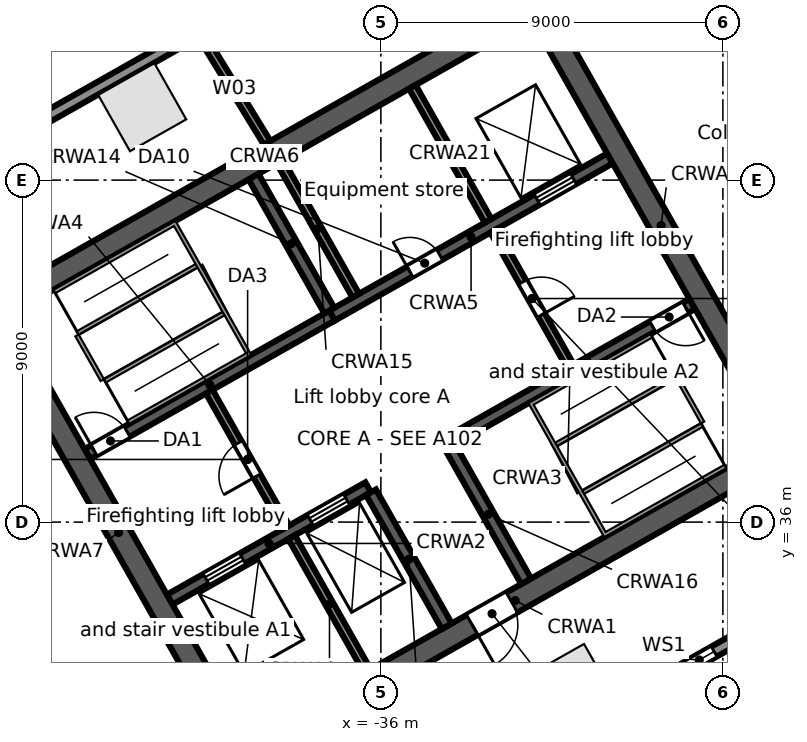
"""IFC4 building model, lengths in metres.
Left out: names, types, materials, properties, quantities, classifications, styles, units other than length and angle.
Written with IfcOpenShell. Run it as: python <this file> out.ifc"""

import sys

from ifc_helpers import new_model, si_unit, direction, frame, frame_2d, origin, origin_2d, place, context, subcontext, project, spatial, rectangle, extrude, element, fill, save


model = new_model("IFC4")
c1 = context("Model", 3, precision=1e-05, world=origin(), true_north=direction((0.0, 1.0)))
c2 = subcontext(c1, "Body", "Model", "MODEL_VIEW")
j1 = project(units=[si_unit("LENGTHUNIT", "METRE"), si_unit("PLANEANGLEUNIT", "RADIAN")], contexts=[c1])
p1 = place(None, origin())
s1 = spatial("IfcSite", under=j1, at=p1, CompositionType="ELEMENT")
p2 = place(p1, origin())
s2 = spatial("IfcBuilding", under=s1, at=p2, CompositionType="ELEMENT")
p3 = place(p2, frame((0.0, 0.0, 56.5)))
s3 = spatial("IfcBuildingStorey", under=s2, at=p3, CompositionType="ELEMENT", Elevation=56.5)
for number, where, z_axis, x_axis in (
    (1, (-42.28, 46.919, 0.0), (0.0, 0.0, 1.0), (-0.87, -0.492, 0.0)),
    (2, (-30.976, 31.635, 0.0), (0.0, 0.0, 1.0), (0.87, 0.492, 0.0)),
):
    element("IfcColumn", number, at=place(p3, frame(where, z_axis=z_axis, x_axis=x_axis)), inside=s3, PredefinedType="COLUMN", context=c2, shape_type="SweptSolid", body=[
        extrude(rectangle(XDim=1.7, YDim=1.7, at=origin_2d()), origin(), (0.0, 0.0, 1.0), 5.0),
    ])
p4 = place(p3, frame((-58.745, 38.764, 0.0), z_axis=(0.0, 0.0, 1.0), x_axis=(0.870355811726, 0.492423355453, 0.0)))
e3 = element("IfcWall", 3, at=p4, inside=s3, PredefinedType="STANDARD", context=c2, shape_type="SweptSolid", body=[
    extrude(rectangle(XDim=64.025, YDim=0.3, at=frame_2d((32.013, 0.0))), origin(), (0.0, 0.0, 1.0), 4.68),
])
p5 = place(p4, frame((60.122, 0.0, 0.6)))
e4 = element("IfcOpeningElement", 4, at=p5, cuts=e3, PredefinedType="OPENING", context=c2, shape_type="SweptSolid", body=[
    extrude(rectangle(XDim=0.9, YDim=3.2, at=frame_2d((0.45, 1.6))), frame((0.0, 0.16, 0.0), z_axis=(0.0, -1.0, 0.0), x_axis=(1.0, 0.0, 0.0)), (0.0, 0.0, 1.0), 0.32),
])
p6 = place(p4, frame((50.992, 0.0, 0.6)))
e5 = element("IfcOpeningElement", 5, at=p6, cuts=e3, PredefinedType="OPENING", context=c2, shape_type="SweptSolid", body=[
    extrude(rectangle(XDim=0.9, YDim=3.2, at=frame_2d((0.45, 1.6))), frame((0.0, 0.16, 0.0), z_axis=(0.0, -1.0, 0.0), x_axis=(1.0, 0.0, 0.0)), (0.0, 0.0, 1.0), 0.32),
])
p7 = place(p4, frame((41.862, 0.0, 0.6)))
e6 = element("IfcOpeningElement", 6, at=p7, cuts=e3, PredefinedType="OPENING", context=c2, shape_type="SweptSolid", body=[
    extrude(rectangle(XDim=0.9, YDim=3.2, at=frame_2d((0.45, 1.6))), frame((0.0, 0.16, 0.0), z_axis=(0.0, -1.0, 0.0), x_axis=(1.0, 0.0, 0.0)), (0.0, 0.0, 1.0), 0.32),
])
p8 = place(p4, frame((32.732, 0.0, 0.6)))
e7 = element("IfcOpeningElement", 7, at=p8, cuts=e3, PredefinedType="OPENING", context=c2, shape_type="SweptSolid", body=[
    extrude(rectangle(XDim=0.9, YDim=3.2, at=frame_2d((0.45, 1.6))), frame((0.0, 0.16, 0.0), z_axis=(0.0, -1.0, 0.0), x_axis=(1.0, 0.0, 0.0)), (0.0, 0.0, 1.0), 0.32),
])
p9 = place(p4, frame((23.602, 0.0, 0.6)))
e8 = element("IfcOpeningElement", 8, at=p9, cuts=e3, PredefinedType="OPENING", context=c2, shape_type="SweptSolid", body=[
    extrude(rectangle(XDim=0.9, YDim=3.2, at=frame_2d((0.45, 1.6))), frame((0.0, 0.16, 0.0), z_axis=(0.0, -1.0, 0.0), x_axis=(1.0, 0.0, 0.0)), (0.0, 0.0, 1.0), 0.32),
])
p10 = place(p4, frame((14.472, 0.0, 0.6)))
e9 = element("IfcOpeningElement", 9, at=p10, cuts=e3, PredefinedType="OPENING", context=c2, shape_type="SweptSolid", body=[
    extrude(rectangle(XDim=0.9, YDim=3.2, at=frame_2d((0.45, 1.6))), frame((0.0, 0.16, 0.0), z_axis=(0.0, -1.0, 0.0), x_axis=(1.0, 0.0, 0.0)), (0.0, 0.0, 1.0), 0.32),
])
p11 = place(p4, frame((5.342, 0.0, 0.6)))
e10 = element("IfcOpeningElement", 10, at=p11, cuts=e3, PredefinedType="OPENING", context=c2, shape_type="SweptSolid", body=[
    extrude(rectangle(XDim=0.9, YDim=3.2, at=frame_2d((0.45, 1.6))), frame((0.0, 0.16, 0.0), z_axis=(0.0, -1.0, 0.0), x_axis=(1.0, 0.0, 0.0)), (0.0, 0.0, 1.0), 0.32),
])
p12 = place(p3, frame((-44.109, 26.504, 0.0), z_axis=(0.0, 0.0, 1.0), x_axis=(-0.857169502585, 0.515034410344, 0.0)))
e11 = element("IfcWall", 11, at=p12, inside=s3, PredefinedType="STANDARD", context=c2, shape_type="SweptSolid", body=[
    extrude(rectangle(XDim=17.127, YDim=0.3, at=frame_2d((8.563, 0.0))), origin(), (0.0, 0.0, 1.0), 4.68),
])
p13 = place(p12, frame((13.403, 0.0, 0.6)))
e12 = element("IfcOpeningElement", 12, at=p13, cuts=e11, PredefinedType="OPENING", context=c2, shape_type="SweptSolid", body=[
    extrude(rectangle(XDim=0.9, YDim=3.2, at=frame_2d((0.45, 1.6))), frame((0.0, 0.16, 0.0), z_axis=(0.0, -1.0, 0.0), x_axis=(1.0, 0.0, 0.0)), (0.0, 0.0, 1.0), 0.32),
])
p14 = place(p12, frame((4.903, 0.0, 0.6)))
e13 = element("IfcOpeningElement", 13, at=p14, cuts=e11, PredefinedType="OPENING", context=c2, shape_type="SweptSolid", body=[
    extrude(rectangle(XDim=0.9, YDim=3.2, at=frame_2d((0.45, 1.6))), frame((0.0, 0.16, 0.0), z_axis=(0.0, -1.0, 0.0), x_axis=(1.0, 0.0, 0.0)), (0.0, 0.0, 1.0), 0.32),
])
p15 = place(p3, frame((-0.055, 47.969, 0.0), z_axis=(0.0, 0.0, 1.0), x_axis=(-0.870355730478, -0.492423499058, 0.0)))
e14 = element("IfcWall", 14, at=p15, inside=s3, PredefinedType="STANDARD", context=c2, shape_type="SweptSolid", body=[
    extrude(rectangle(XDim=43.75, YDim=0.3, at=frame_2d((21.875, 0.0))), origin(), (0.0, 0.0, 1.0), 4.68),
])
p16 = place(p15, frame((39.977, 0.0, 0.6)))
e15 = element("IfcOpeningElement", 15, at=p16, cuts=e14, PredefinedType="OPENING", context=c2, shape_type="SweptSolid", body=[
    extrude(rectangle(XDim=0.9, YDim=3.2, at=frame_2d((0.45, 1.6))), frame((0.0, 0.16, 0.0), z_axis=(0.0, -1.0, 0.0), x_axis=(1.0, 0.0, 0.0)), (0.0, 0.0, 1.0), 0.32),
])
p17 = place(p15, frame((31.222, 0.0, 0.6)))
e16 = element("IfcOpeningElement", 16, at=p17, cuts=e14, PredefinedType="OPENING", context=c2, shape_type="SweptSolid", body=[
    extrude(rectangle(XDim=0.9, YDim=3.2, at=frame_2d((0.45, 1.6))), frame((0.0, 0.16, 0.0), z_axis=(0.0, -1.0, 0.0), x_axis=(1.0, 0.0, 0.0)), (0.0, 0.0, 1.0), 0.32),
])
p18 = place(p15, frame((22.468, 0.0, 0.6)))
e17 = element("IfcOpeningElement", 17, at=p18, cuts=e14, PredefinedType="OPENING", context=c2, shape_type="SweptSolid", body=[
    extrude(rectangle(XDim=0.9, YDim=3.2, at=frame_2d((0.45, 1.6))), frame((0.0, 0.16, 0.0), z_axis=(0.0, -1.0, 0.0), x_axis=(1.0, 0.0, 0.0)), (0.0, 0.0, 1.0), 0.32),
])
p19 = place(p15, frame((13.713, 0.0, 0.6)))
e18 = element("IfcOpeningElement", 18, at=p19, cuts=e14, PredefinedType="OPENING", context=c2, shape_type="SweptSolid", body=[
    extrude(rectangle(XDim=0.9, YDim=3.2, at=frame_2d((0.45, 1.6))), frame((0.0, 0.16, 0.0), z_axis=(0.0, -1.0, 0.0), x_axis=(1.0, 0.0, 0.0)), (0.0, 0.0, 1.0), 0.32),
])
p20 = place(p15, frame((4.959, 0.0, 0.6)))
e19 = element("IfcOpeningElement", 19, at=p20, cuts=e14, PredefinedType="OPENING", context=c2, shape_type="SweptSolid", body=[
    extrude(rectangle(XDim=0.9, YDim=3.2, at=frame_2d((0.45, 1.6))), frame((0.0, 0.16, 0.0), z_axis=(0.0, -1.0, 0.0), x_axis=(1.0, 0.0, 0.0)), (0.0, 0.0, 1.0), 0.32),
])
p21 = place(p3, frame((-39.862, 29.749, 0.0), z_axis=(0.0, 0.0, 1.0), x_axis=(0.870350116061, 0.492433422375, 0.0)))
e20 = element("IfcWall", 20, at=p21, inside=s3, PredefinedType="SOLIDWALL", context=c2, shape_type="SweptSolid", body=[
    extrude(rectangle(XDim=17.0, YDim=0.6, at=frame_2d((8.5, 0.0))), origin(), (0.0, 0.0, 1.0), 4.68),
])
p22 = place(p21, frame((7.2, 0.0, 0.0)))
e21 = element("IfcOpeningElement", 21, at=p22, cuts=e20, PredefinedType="OPENING", context=c2, shape_type="SweptSolid", body=[
    extrude(rectangle(XDim=1.2, YDim=2.1, at=frame_2d((0.6, 1.05))), frame((0.0, 0.31, 0.0), z_axis=(0.0, -1.0, 0.0), x_axis=(1.0, 0.0, 0.0)), (0.0, 0.0, 1.0), 0.62),
])
p23 = place(p3, frame((-41.556, 33.961, 0.0), z_axis=(0.0, 0.0, 1.0), x_axis=(0.870343731308, 0.492444706919, 0.0)))
e22 = element("IfcWall", 22, at=p23, inside=s3, PredefinedType="SOLIDWALL", context=c2, shape_type="SweptSolid", body=[
    extrude(rectangle(XDim=6.0, YDim=0.3, at=frame_2d((3.0, 0.0))), origin(), (0.0, 0.0, 1.0), 4.68),
])
p24 = place(p23, frame((1.1, 0.0, 0.0)))
e23 = element("IfcOpeningElement", 23, at=p24, cuts=e22, PredefinedType="OPENING", context=c2, shape_type="SweptSolid", body=[
    extrude(rectangle(XDim=1.1, YDim=2.1, at=frame_2d((0.55, 1.05))), frame((0.0, 0.16, 0.0), z_axis=(0.0, -1.0, 0.0), x_axis=(1.0, 0.0, 0.0)), (0.0, 0.0, 1.0), 0.32),
])
p25 = place(p23, frame((4.25, 0.0, 0.0)))
e24 = element("IfcOpeningElement", 24, at=p25, cuts=e22, PredefinedType="OPENING", context=c2, shape_type="SweptSolid", body=[
    extrude(rectangle(XDim=1.1, YDim=2.1, at=frame_2d((0.55, 1.05))), frame((0.0, 0.16, 0.0), z_axis=(0.0, -1.0, 0.0), x_axis=(1.0, 0.0, 0.0)), (0.0, 0.0, 1.0), 0.32),
])
p26 = place(p3, frame((-34.245, 38.097, 0.0), z_axis=(0.0, 0.0, 1.0), x_axis=(0.870364910201, 0.492407273597, 0.0)))
e25 = element("IfcWall", 25, at=p26, inside=s3, PredefinedType="SOLIDWALL", context=c2, shape_type="SweptSolid", body=[
    extrude(rectangle(XDim=7.4, YDim=0.3, at=frame_2d((3.7, 0.0))), origin(), (0.0, 0.0, 1.0), 4.68),
])
p27 = place(p26, frame((6.2, 0.0, 0.0)))
e26 = element("IfcOpeningElement", 26, at=p27, cuts=e25, PredefinedType="OPENING", context=c2, shape_type="SweptSolid", body=[
    extrude(rectangle(XDim=1.0, YDim=2.1, at=frame_2d((0.5, 1.05))), frame((0.0, 0.16, 0.0), z_axis=(0.0, -1.0, 0.0), x_axis=(1.0, 0.0, 0.0)), (0.0, 0.0, 1.0), 0.32),
])
p28 = place(p3, frame((-43.723, 37.791, 0.0), z_axis=(0.0, 0.0, 1.0), x_axis=(0.87035077051, 0.49243226567, 0.0)))
e27 = element("IfcWall", 27, at=p28, inside=s3, PredefinedType="SOLIDWALL", context=c2, shape_type="SweptSolid", body=[
    extrude(rectangle(XDim=7.4, YDim=0.3, at=frame_2d((3.7, 0.0))), origin(), (0.0, 0.0, 1.0), 4.68),
])
p29 = place(p28, frame((0.2, 0.0, 0.0)))
e28 = element("IfcOpeningElement", 28, at=p29, cuts=e27, PredefinedType="OPENING", context=c2, shape_type="SweptSolid", body=[
    extrude(rectangle(XDim=1.0, YDim=2.1, at=frame_2d((0.5, 1.05))), frame((0.0, 0.16, 0.0), z_axis=(0.0, -1.0, 0.0), x_axis=(1.0, 0.0, 0.0)), (0.0, 0.0, 1.0), 0.32),
])
p30 = place(p3, frame((-37.282, 41.435, 0.0), z_axis=(0.0, 0.0, 1.0), x_axis=(0.870356516133, 0.492422110414, 0.0)))
e29 = element("IfcWall", 29, at=p30, inside=s3, PredefinedType="SOLIDWALL", context=c2, shape_type="SweptSolid", body=[
    extrude(rectangle(XDim=8.4, YDim=0.3, at=frame_2d((4.2, 0.0))), origin(), (0.0, 0.0, 1.0), 4.68),
])
p31 = place(p30, frame((6.2, 0.0, 0.0)))
e30 = element("IfcOpeningElement", 30, at=p31, cuts=e29, PredefinedType="OPENING", context=c2, shape_type="SweptSolid", body=[
    extrude(rectangle(XDim=1.1, YDim=2.1, at=frame_2d((0.55, 1.05))), frame((0.0, 0.16, 0.0), z_axis=(0.0, -1.0, 0.0), x_axis=(1.0, 0.0, 0.0)), (0.0, 0.0, 1.0), 0.32),
])
p32 = place(p30, frame((2.35, 0.0, 0.0)))
e31 = element("IfcOpeningElement", 31, at=p32, cuts=e29, PredefinedType="OPENING", context=c2, shape_type="SweptSolid", body=[
    extrude(rectangle(XDim=0.9, YDim=2.1, at=frame_2d((0.45, 1.05))), frame((0.0, 0.16, 0.0), z_axis=(0.0, -1.0, 0.0), x_axis=(1.0, 0.0, 0.0)), (0.0, 0.0, 1.0), 0.32),
])
p33 = place(p3, frame((-46.461, 41.412, 0.0), z_axis=(0.0, 0.0, 1.0), x_axis=(0.870350116061, 0.492433422375, 0.0)))
e32 = element("IfcWall", 32, at=p33, inside=s3, PredefinedType="SOLIDWALL", context=c2, shape_type="SweptSolid", body=[
    extrude(rectangle(XDim=17.0, YDim=0.6, at=frame_2d((8.5, 0.0))), origin(), (0.0, 0.0, 1.0), 4.68),
])
p34 = place(p3, frame((-46.052, 41.298, 0.0), z_axis=(0.0, 0.0, 1.0), x_axis=(0.492418598281, -0.870358503186, 0.0)))
e33 = element("IfcWall", 33, at=p34, inside=s3, PredefinedType="SOLIDWALL", context=c2, shape_type="SweptSolid", body=[
    extrude(rectangle(XDim=12.8, YDim=0.6, at=frame_2d((6.4, 0.0))), origin(), (0.0, 0.0, 1.0), 4.68),
])
p35 = place(p3, frame((-38.349, 35.603, 0.0), z_axis=(0.0, 0.0, 1.0), x_axis=(0.49241474071, -0.870360685654, 0.0)))
e34 = element("IfcWall", 34, at=p35, inside=s3, PredefinedType="SOLIDWALL", context=c2, shape_type="SweptSolid", body=[
    extrude(rectangle(XDim=4.05, YDim=0.2, at=frame_2d((2.025, 0.0))), origin(), (0.0, 0.0, 1.0), 4.68),
])
p36 = place(p3, frame((-40.516, 39.433, 0.0), z_axis=(0.0, 0.0, 1.0), x_axis=(0.492453559952, -0.87033872216, 0.0)))
e35 = element("IfcWall", 35, at=p36, inside=s3, PredefinedType="PARTITIONING", context=c2, shape_type="SweptSolid", body=[
    extrude(rectangle(XDim=4.1, YDim=0.2, at=frame_2d((2.05, 0.0))), origin(), (0.0, 0.0, 1.0), 4.68),
])
p37 = place(p36, frame((1.55, 0.0, 0.0)))
e36 = element("IfcOpeningElement", 36, at=p37, cuts=e35, PredefinedType="OPENING", context=c2, shape_type="SweptSolid", body=[
    extrude(rectangle(XDim=1.0, YDim=2.1, at=frame_2d((0.5, 1.05))), frame((0.0, 0.11, 0.0), z_axis=(0.0, -1.0, 0.0), x_axis=(1.0, 0.0, 0.0)), (0.0, 0.0, 1.0), 0.22),
])
p38 = place(p3, frame((-36.26, 36.785, 0.0), z_axis=(0.0, 0.0, 1.0), x_axis=(0.492440575896, -0.870346068648, 0.0)))
e37 = element("IfcWall", 37, at=p38, inside=s3, PredefinedType="SOLIDWALL", context=c2, shape_type="SweptSolid", body=[
    extrude(rectangle(XDim=4.05, YDim=0.3, at=frame_2d((2.025, 0.0))), origin(), (0.0, 0.0, 1.0), 4.68),
])
p39 = place(p3, frame((-39.35, 45.09, 0.0), z_axis=(0.0, 0.0, 1.0), x_axis=(0.49241474071, -0.870360685654, 0.0)))
e38 = element("IfcWall", 38, at=p39, inside=s3, PredefinedType="SOLIDWALL", context=c2, shape_type="SweptSolid", body=[
    extrude(rectangle(XDim=4.05, YDim=0.3, at=frame_2d((2.025, 0.0))), origin(), (0.0, 0.0, 1.0), 4.68),
])
p40 = place(p3, frame((-38.654, 45.484, 0.0), z_axis=(0.0, 0.0, 1.0), x_axis=(0.492440575896, -0.870346068648, 0.0)))
e39 = element("IfcWall", 39, at=p40, inside=s3, PredefinedType="SOLIDWALL", context=c2, shape_type="SweptSolid", body=[
    extrude(rectangle(XDim=4.05, YDim=0.2, at=frame_2d((2.025, 0.0))), origin(), (0.0, 0.0, 1.0), 4.68),
])
p41 = place(p3, frame((-34.171, 37.967, 0.0), z_axis=(0.0, 0.0, 1.0), x_axis=(0.492394910396, -0.870371904542, 0.0)))
e40 = element("IfcWall", 40, at=p41, inside=s3, PredefinedType="SOLIDWALL", context=c2, shape_type="SweptSolid", body=[
    extrude(rectangle(XDim=4.05, YDim=0.3, at=frame_2d((2.025, 0.0))), origin(), (0.0, 0.0, 1.0), 4.68),
])
p42 = place(p3, frame((-33.031, 43.667, 0.0), z_axis=(0.0, 0.0, 1.0), x_axis=(0.492408451753, -0.87036424366, 0.0)))
e41 = element("IfcWall", 41, at=p42, inside=s3, PredefinedType="PARTITIONING", context=c2, shape_type="SweptSolid", body=[
    extrude(rectangle(XDim=4.1, YDim=0.2, at=frame_2d((2.05, 0.0))), origin(), (0.0, 0.0, 1.0), 4.68),
])
p43 = place(p42, frame((1.55, 0.0, 0.0)))
e42 = element("IfcOpeningElement", 42, at=p43, cuts=e41, PredefinedType="OPENING", context=c2, shape_type="SweptSolid", body=[
    extrude(rectangle(XDim=1.0, YDim=2.1, at=frame_2d((0.5, 1.05))), frame((0.0, 0.11, 0.0), z_axis=(0.0, -1.0, 0.0), x_axis=(1.0, 0.0, 0.0)), (0.0, 0.0, 1.0), 0.22),
])
p44 = place(p3, frame((-35.173, 47.454, 0.0), z_axis=(0.0, 0.0, 1.0), x_axis=(0.492440575896, -0.870346068648, 0.0)))
e43 = element("IfcWall", 43, at=p44, inside=s3, PredefinedType="SOLIDWALL", context=c2, shape_type="SweptSolid", body=[
    extrude(rectangle(XDim=4.05, YDim=0.2, at=frame_2d((2.025, 0.0))), origin(), (0.0, 0.0, 1.0), 4.68),
])
p45 = place(p3, frame((-31.778, 49.374, 0.0), z_axis=(0.0, 0.0, 1.0), x_axis=(0.492433046652, -0.870350328641, 0.0)))
e44 = element("IfcWall", 44, at=p45, inside=s3, PredefinedType="SOLIDWALL", context=c2, shape_type="SweptSolid", body=[
    extrude(rectangle(XDim=12.8, YDim=0.6, at=frame_2d((6.4, 0.0))), origin(), (0.0, 0.0, 1.0), 4.68),
])
p46 = place(p3, frame((-40.713, 48.794, 0.0), z_axis=(0.0, 0.0, 1.0), x_axis=(0.52165366254, -0.853157345604, 0.0)))
e45 = element("IfcWall", 45, at=p46, inside=s3, PredefinedType="PARTITIONING", context=c2, shape_type="SweptSolid", body=[
    extrude(rectangle(XDim=3.297, YDim=0.2, at=frame_2d((1.648, 0.0))), origin(), (0.0, 0.0, 1.0), 3.96),
])
p47 = place(p17, origin())
e46 = element("IfcWindow", 46, at=p47, inside=s3, PartitioningType="SINGLE_PANEL", PredefinedType="WINDOW", context=c2, shape_type="SweptSolid", body=[
    extrude(rectangle(XDim=0.9, YDim=3.2, at=frame_2d((0.45, 1.6))), frame((0.0, 0.03, 0.0), z_axis=(0.0, -1.0, 0.0), x_axis=(1.0, 0.0, 0.0)), (0.0, 0.0, 1.0), 0.06),
])
fill(e16, e46)
p48 = place(p31, origin())
e47 = element("IfcDoor", 47, at=p48, inside=s3, OperationType="DOUBLE_DOOR_SLIDING", PredefinedType="DOOR", context=c2, shape_type="SweptSolid", body=[
    extrude(rectangle(XDim=1.1, YDim=2.1, at=frame_2d((0.55, 1.05))), frame((0.0, 0.025, 0.0), z_axis=(0.0, -1.0, 0.0), x_axis=(1.0, 0.0, 0.0)), (0.0, 0.0, 1.0), 0.05),
])
fill(e30, e47)
p49 = place(p24, origin())
e48 = element("IfcDoor", 48, at=p49, inside=s3, OperationType="DOUBLE_DOOR_SLIDING", PredefinedType="DOOR", context=c2, shape_type="SweptSolid", body=[
    extrude(rectangle(XDim=1.1, YDim=2.1, at=frame_2d((0.55, 1.05))), frame((0.0, 0.025, 0.0), z_axis=(0.0, -1.0, 0.0), x_axis=(1.0, 0.0, 0.0)), (0.0, 0.0, 1.0), 0.05),
])
fill(e23, e48)
p50 = place(p25, origin())
e49 = element("IfcDoor", 49, at=p50, inside=s3, OperationType="DOUBLE_DOOR_SLIDING", PredefinedType="DOOR", context=c2, shape_type="SweptSolid", body=[
    extrude(rectangle(XDim=1.1, YDim=2.1, at=frame_2d((0.55, 1.05))), frame((0.0, 0.025, 0.0), z_axis=(0.0, -1.0, 0.0), x_axis=(1.0, 0.0, 0.0)), (0.0, 0.0, 1.0), 0.05),
])
fill(e24, e49)
p51 = place(p29, origin())
e50 = element("IfcDoor", 50, at=p51, inside=s3, OperationType="SINGLE_SWING_LEFT", PredefinedType="DOOR", context=c2, shape_type="SweptSolid", body=[
    extrude(rectangle(XDim=1.0, YDim=2.1, at=frame_2d((0.5, 1.05))), frame((0.0, 0.025, 0.0), z_axis=(0.0, -1.0, 0.0), x_axis=(1.0, 0.0, 0.0)), (0.0, 0.0, 1.0), 0.05),
])
fill(e28, e50)
p52 = place(p27, frame((1.0, 0.0, 0.0), z_axis=(0.0, 0.0, 1.0), x_axis=(-1.0, 0.0, 0.0)))
e51 = element("IfcDoor", 51, at=p52, inside=s3, OperationType="SINGLE_SWING_LEFT", PredefinedType="DOOR", context=c2, shape_type="SweptSolid", body=[
    extrude(rectangle(XDim=1.0, YDim=2.1, at=frame_2d((0.5, 1.05))), frame((0.0, 0.025, 0.0), z_axis=(0.0, -1.0, 0.0), x_axis=(1.0, 0.0, 0.0)), (0.0, 0.0, 1.0), 0.05),
])
fill(e26, e51)
p53 = place(p37, frame((1.0, 0.0, 0.0), z_axis=(0.0, 0.0, 1.0), x_axis=(-1.0, 0.0, 0.0)))
e52 = element("IfcDoor", 52, at=p53, inside=s3, OperationType="SINGLE_SWING_LEFT", PredefinedType="DOOR", context=c2, shape_type="SweptSolid", body=[
    extrude(rectangle(XDim=1.0, YDim=2.1, at=frame_2d((0.5, 1.05))), frame((0.0, 0.025, 0.0), z_axis=(0.0, -1.0, 0.0), x_axis=(1.0, 0.0, 0.0)), (0.0, 0.0, 1.0), 0.05),
])
fill(e36, e52)
p54 = place(p43, origin())
e53 = element("IfcDoor", 53, at=p54, inside=s3, OperationType="SINGLE_SWING_RIGHT", PredefinedType="DOOR", context=c2, shape_type="SweptSolid", body=[
    extrude(rectangle(XDim=1.0, YDim=2.1, at=frame_2d((0.5, 1.05))), frame((0.0, 0.025, 0.0), z_axis=(0.0, -1.0, 0.0), x_axis=(1.0, 0.0, 0.0)), (0.0, 0.0, 1.0), 0.05),
])
fill(e42, e53)
p55 = place(p22, frame((1.2, 0.0, 0.0), z_axis=(0.0, 0.0, 1.0), x_axis=(-1.0, 0.0, 0.0)))
e54 = element("IfcDoor", 54, at=p55, inside=s3, OperationType="SINGLE_SWING_RIGHT", PredefinedType="DOOR", context=c2, shape_type="SweptSolid", body=[
    extrude(rectangle(XDim=1.2, YDim=2.1, at=frame_2d((0.6, 1.05))), frame((0.0, 0.025, 0.0), z_axis=(0.0, -1.0, 0.0), x_axis=(1.0, 0.0, 0.0)), (0.0, 0.0, 1.0), 0.05),
])
fill(e21, e54)
p56 = place(p32, origin())
e55 = element("IfcDoor", 55, at=p56, inside=s3, OperationType="SINGLE_SWING_LEFT", PredefinedType="DOOR", context=c2, shape_type="SweptSolid", body=[
    extrude(rectangle(XDim=0.9, YDim=2.1, at=frame_2d((0.45, 1.05))), frame((0.0, 0.025, 0.0), z_axis=(0.0, -1.0, 0.0), x_axis=(1.0, 0.0, 0.0)), (0.0, 0.0, 1.0), 0.05),
])
fill(e31, e55)
save(model, sys.argv[1])
